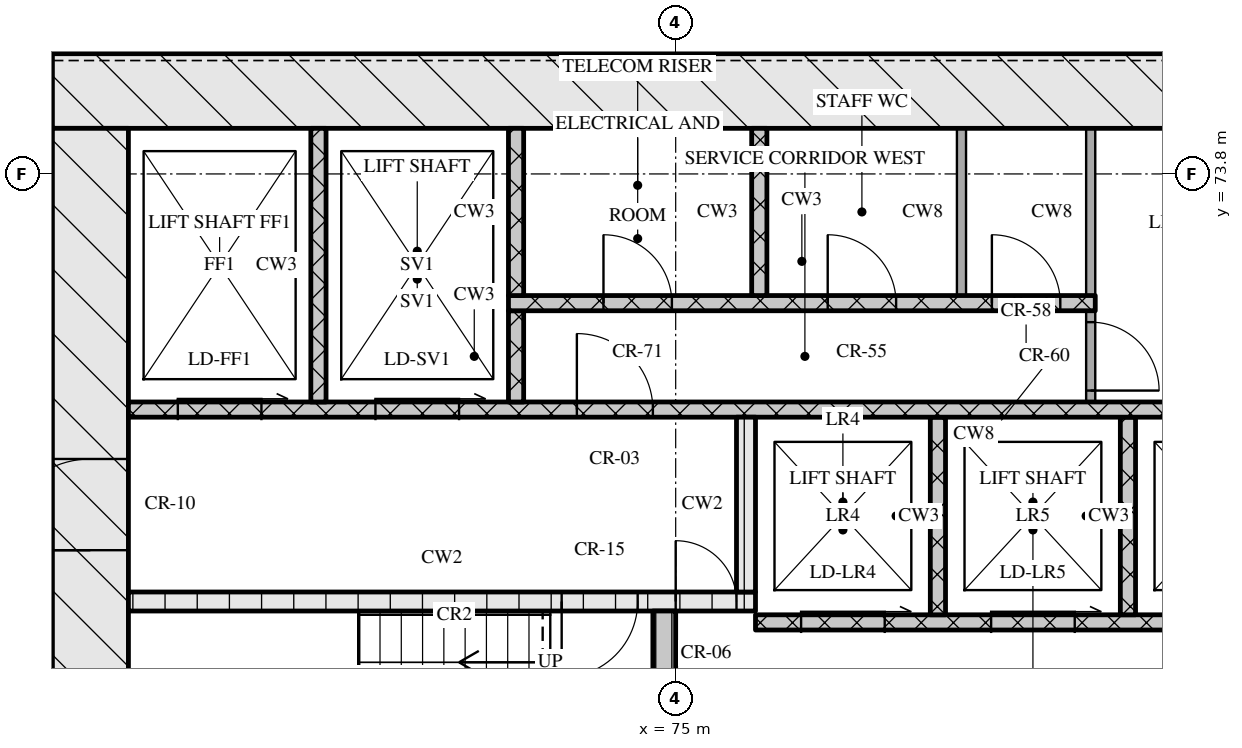
"""IFC4 building model, lengths in metres.
Left out: names, types, materials, properties, quantities, classifications, styles, units other than length and angle.
Written with IfcOpenShell. Run it as: python <this file> out.ifc"""

import sys

from ifc_helpers import new_model, si_unit, direction, frame, frame_2d, origin, place, context, subcontext, project, spatial, rectangle, extrude, element, fill, save


model = new_model("IFC4")
c1 = context("Model", 3, precision=1e-05, world=origin(), true_north=direction((0.0, 1.0)))
c2 = subcontext(c1, "Body", "Model", "MODEL_VIEW")
j1 = project(units=[si_unit("LENGTHUNIT", "METRE"), si_unit("PLANEANGLEUNIT", "RADIAN")], contexts=[c1])
p1 = place(None, origin())
s1 = spatial("IfcSite", under=j1, at=p1, CompositionType="ELEMENT")
p2 = place(p1, origin())
s2 = spatial("IfcBuilding", under=s1, at=p2, CompositionType="ELEMENT")
p3 = place(p2, frame((0.0, 0.0, 124.05)))
s3 = spatial("IfcBuildingStorey", under=s2, at=p3, CompositionType="ELEMENT", Elevation=124.05)
p4 = place(p3, frame((66.8, 74.9, 0.0), z_axis=(0.0, 0.0, 1.0), x_axis=(1.0, 0.0, 0.0)))
e1 = element("IfcWall", 1, at=p4, inside=s3, PredefinedType="SOLIDWALL", context=c2, shape_type="SweptSolid", body=[
    extrude(rectangle(XDim=41.6, YDim=1.0, at=frame_2d((20.8, 0.0))), origin(), (0.0, 0.0, 1.0), 3.32),
])
p5 = place(p3, frame((67.3, 62.4, 0.0), z_axis=(0.0, 0.0, 1.0), x_axis=(0.0, 1.0, 0.0)))
e2 = element("IfcWall", 2, at=p5, inside=s3, PredefinedType="SOLIDWALL", context=c2, shape_type="SweptSolid", body=[
    extrude(rectangle(XDim=12.0, YDim=1.0, at=frame_2d((6.0, 0.0))), origin(), (0.0, 0.0, 1.0), 3.32),
])
p6 = place(p5, frame((6.45, 0.0, 0.0)))
e3 = element("IfcOpeningElement", 3, at=p6, cuts=e2, PredefinedType="OPENING", context=c2, shape_type="SweptSolid", body=[
    extrude(rectangle(XDim=1.2, YDim=2.1, at=frame_2d((0.6, 1.05))), frame((0.0, 0.51, 0.0), z_axis=(0.0, -1.0, 0.0), x_axis=(1.0, 0.0, 0.0)), (0.0, 0.0, 1.0), 1.02),
])
p7 = place(p3, frame((74.85, 65.2, 0.0), z_axis=(0.0, 0.0, 1.0), x_axis=(0.0, 1.0, 0.0)))
e4 = element("IfcWall", 4, at=p7, inside=s3, PredefinedType="SOLIDWALL", context=c2, shape_type="SweptSolid", body=[
    extrude(rectangle(XDim=2.85, YDim=0.3, at=frame_2d((1.425, 0.0))), origin(), (0.0, 0.0, 1.0), 3.32),
])
p8 = place(p3, frame((76.05, 67.9, 0.0), z_axis=(0.0, 0.0, 1.0), x_axis=(1.0, 0.0, 0.0)))
e5 = element("IfcWall", 5, at=p8, inside=s3, PredefinedType="SOLIDWALL", context=c2, shape_type="SweptSolid", body=[
    extrude(rectangle(XDim=23.1, YDim=0.2, at=frame_2d((11.55, 0.0))), origin(), (0.0, 0.0, 1.0), 3.32),
])
p9 = place(p8, frame((0.6, 0.0, 0.0)))
e6 = element("IfcOpeningElement", 6, at=p9, cuts=e5, PredefinedType="OPENING", context=c2, shape_type="SweptSolid", body=[
    extrude(rectangle(XDim=1.1, YDim=2.1, at=frame_2d((0.55, 1.05))), frame((0.0, 0.11, 0.0), z_axis=(0.0, -1.0, 0.0), x_axis=(1.0, 0.0, 0.0)), (0.0, 0.0, 1.0), 0.22),
])
p10 = place(p8, frame((3.1, 0.0, 0.0)))
e7 = element("IfcOpeningElement", 7, at=p10, cuts=e5, PredefinedType="OPENING", context=c2, shape_type="SweptSolid", body=[
    extrude(rectangle(XDim=1.1, YDim=2.1, at=frame_2d((0.55, 1.05))), frame((0.0, 0.11, 0.0), z_axis=(0.0, -1.0, 0.0), x_axis=(1.0, 0.0, 0.0)), (0.0, 0.0, 1.0), 0.22),
])
p11 = place(p8, frame((5.6, 0.0, 0.0)))
e8 = element("IfcOpeningElement", 8, at=p11, cuts=e5, PredefinedType="OPENING", context=c2, shape_type="SweptSolid", body=[
    extrude(rectangle(XDim=1.1, YDim=2.1, at=frame_2d((0.55, 1.05))), frame((0.0, 0.11, 0.0), z_axis=(0.0, -1.0, 0.0), x_axis=(1.0, 0.0, 0.0)), (0.0, 0.0, 1.0), 0.22),
])
p12 = place(p8, frame((8.45, 0.0, 0.0)))
e9 = element("IfcOpeningElement", 9, at=p12, cuts=e5, PredefinedType="OPENING", context=c2, shape_type="SweptSolid", body=[
    extrude(rectangle(XDim=0.9, YDim=2.1, at=frame_2d((0.45, 1.05))), frame((0.0, 0.11, 0.0), z_axis=(0.0, -1.0, 0.0), x_axis=(1.0, 0.0, 0.0)), (0.0, 0.0, 1.0), 0.22),
])
p13 = place(p8, frame((10.91, 0.0, 0.0)))
e10 = element("IfcOpeningElement", 10, at=p13, cuts=e5, PredefinedType="OPENING", context=c2, shape_type="SweptSolid", body=[
    extrude(rectangle(XDim=0.9, YDim=2.1, at=frame_2d((0.45, 1.05))), frame((0.0, 0.11, 0.0), z_axis=(0.0, -1.0, 0.0), x_axis=(1.0, 0.0, 0.0)), (0.0, 0.0, 1.0), 0.22),
])
p14 = place(p8, frame((13.55, 0.0, 0.0)))
e11 = element("IfcOpeningElement", 11, at=p14, cuts=e5, PredefinedType="OPENING", context=c2, shape_type="SweptSolid", body=[
    extrude(rectangle(XDim=1.0, YDim=2.1, at=frame_2d((0.5, 1.05))), frame((0.0, 0.11, 0.0), z_axis=(0.0, -1.0, 0.0), x_axis=(1.0, 0.0, 0.0)), (0.0, 0.0, 1.0), 0.22),
])
for number, where, z_axis, x_axis in (
    (12, (78.45, 68.0, 0.0), (0.0, 0.0, 1.0), (0.0, 1.0, 0.0)),
    (13, (80.95, 68.0, 0.0), (0.0, 0.0, 1.0), (0.0, 1.0, 0.0)),
):
    element("IfcWall", number, at=place(p3, frame(where, z_axis=z_axis, x_axis=x_axis)), inside=s3, PredefinedType="SOLIDWALL", context=c2, shape_type="SweptSolid", body=[
        extrude(rectangle(XDim=2.6, YDim=0.2, at=frame_2d((1.3, 0.0))), origin(), (0.0, 0.0, 1.0), 3.32),
    ])
p15 = place(p3, frame((67.8, 68.175, 0.0), z_axis=(0.0, 0.0, 1.0), x_axis=(1.0, 0.0, 0.0)))
e14 = element("IfcWall", 14, at=p15, inside=s3, PredefinedType="SOLIDWALL", context=c2, shape_type="SweptSolid", body=[
    extrude(rectangle(XDim=8.25, YDim=0.25, at=frame_2d((4.125, 0.0))), origin(), (0.0, 0.0, 1.0), 3.32),
])
p16 = place(p15, frame((5.7, 0.0, 0.0)))
e15 = element("IfcOpeningElement", 15, at=p16, cuts=e14, PredefinedType="OPENING", context=c2, shape_type="SweptSolid", body=[
    extrude(rectangle(XDim=1.0, YDim=2.1, at=frame_2d((0.5, 1.05))), frame((0.0, 0.135, 0.0), z_axis=(0.0, -1.0, 0.0), x_axis=(1.0, 0.0, 0.0)), (0.0, 0.0, 1.0), 0.27),
])
p17 = place(p15, frame((7.2, 0.0, 0.0)))
e16 = element("IfcOpeningElement", 16, at=p17, cuts=e14, PredefinedType="OPENING", context=c2, shape_type="SweptSolid", body=[
    extrude(rectangle(XDim=0.8, YDim=2.1, at=frame_2d((0.4, 1.05))), frame((0.0, 0.135, 0.0), z_axis=(0.0, -1.0, 0.0), x_axis=(1.0, 0.0, 0.0)), (0.0, 0.0, 1.0), 0.27),
])
p18 = place(p3, frame((75.925, 68.3, 0.0), z_axis=(0.0, 0.0, 1.0), x_axis=(0.0, 1.0, 0.0)))
e17 = element("IfcWall", 17, at=p18, inside=s3, PredefinedType="SOLIDWALL", context=c2, shape_type="SweptSolid", body=[
    extrude(rectangle(XDim=2.3, YDim=0.25, at=frame_2d((1.15, 0.0))), origin(), (0.0, 0.0, 1.0), 3.32),
])
p19 = place(p3, frame((67.8, 70.7, 0.0), z_axis=(0.0, 0.0, 1.0), x_axis=(1.0, 0.0, 0.0)))
e18 = element("IfcWall", 18, at=p19, inside=s3, PredefinedType="SOLIDWALL", context=c2, shape_type="SweptSolid", body=[
    extrude(rectangle(XDim=39.6, YDim=0.2, at=frame_2d((19.8, 0.0))), origin(), (0.0, 0.0, 1.0), 3.32),
])
p20 = place(p19, frame((0.65, 0.0, 0.0)))
e19 = element("IfcOpeningElement", 19, at=p20, cuts=e18, PredefinedType="OPENING", context=c2, shape_type="SweptSolid", body=[
    extrude(rectangle(XDim=1.1, YDim=2.1, at=frame_2d((0.55, 1.05))), frame((0.0, 0.11, 0.0), z_axis=(0.0, -1.0, 0.0), x_axis=(1.0, 0.0, 0.0)), (0.0, 0.0, 1.0), 0.22),
])
p21 = place(p19, frame((3.25, 0.0, 0.0)))
e20 = element("IfcOpeningElement", 20, at=p21, cuts=e18, PredefinedType="OPENING", context=c2, shape_type="SweptSolid", body=[
    extrude(rectangle(XDim=1.1, YDim=2.1, at=frame_2d((0.55, 1.05))), frame((0.0, 0.11, 0.0), z_axis=(0.0, -1.0, 0.0), x_axis=(1.0, 0.0, 0.0)), (0.0, 0.0, 1.0), 0.22),
])
p22 = place(p19, frame((5.9, 0.0, 0.0)))
e21 = element("IfcOpeningElement", 21, at=p22, cuts=e18, PredefinedType="OPENING", context=c2, shape_type="SweptSolid", body=[
    extrude(rectangle(XDim=1.0, YDim=2.1, at=frame_2d((0.5, 1.05))), frame((0.0, 0.11, 0.0), z_axis=(0.0, -1.0, 0.0), x_axis=(1.0, 0.0, 0.0)), (0.0, 0.0, 1.0), 0.22),
])
p23 = place(p19, frame((21.7, 0.0, 0.0)))
e22 = element("IfcOpeningElement", 22, at=p23, cuts=e18, PredefinedType="OPENING", context=c2, shape_type="SweptSolid", body=[
    extrude(rectangle(XDim=1.0, YDim=2.1, at=frame_2d((0.5, 1.05))), frame((0.0, 0.11, 0.0), z_axis=(0.0, -1.0, 0.0), x_axis=(1.0, 0.0, 0.0)), (0.0, 0.0, 1.0), 0.22),
])
p24 = place(p19, frame((32.7, 0.0, 0.0)))
e23 = element("IfcOpeningElement", 23, at=p24, cuts=e18, PredefinedType="OPENING", context=c2, shape_type="SweptSolid", body=[
    extrude(rectangle(XDim=1.0, YDim=2.1, at=frame_2d((0.5, 1.05))), frame((0.0, 0.11, 0.0), z_axis=(0.0, -1.0, 0.0), x_axis=(1.0, 0.0, 0.0)), (0.0, 0.0, 1.0), 0.22),
])
p25 = place(p19, frame((35.25, 0.0, 0.0)))
e24 = element("IfcOpeningElement", 24, at=p25, cuts=e18, PredefinedType="OPENING", context=c2, shape_type="SweptSolid", body=[
    extrude(rectangle(XDim=1.1, YDim=2.1, at=frame_2d((0.55, 1.05))), frame((0.0, 0.11, 0.0), z_axis=(0.0, -1.0, 0.0), x_axis=(1.0, 0.0, 0.0)), (0.0, 0.0, 1.0), 0.22),
])
p26 = place(p19, frame((37.85, 0.0, 0.0)))
e25 = element("IfcOpeningElement", 25, at=p26, cuts=e18, PredefinedType="OPENING", context=c2, shape_type="SweptSolid", body=[
    extrude(rectangle(XDim=1.1, YDim=2.1, at=frame_2d((0.55, 1.05))), frame((0.0, 0.11, 0.0), z_axis=(0.0, -1.0, 0.0), x_axis=(1.0, 0.0, 0.0)), (0.0, 0.0, 1.0), 0.22),
])
p27 = place(p3, frame((70.3, 70.8, 0.0), z_axis=(0.0, 0.0, 1.0), x_axis=(0.0, 1.0, 0.0)))
e26 = element("IfcWall", 26, at=p27, inside=s3, PredefinedType="SOLIDWALL", context=c2, shape_type="SweptSolid", body=[
    extrude(rectangle(XDim=3.6, YDim=0.2, at=frame_2d((1.8, 0.0))), origin(), (0.0, 0.0, 1.0), 3.32),
])
p28 = place(p3, frame((72.9, 70.8, 0.0), z_axis=(0.0, 0.0, 1.0), x_axis=(0.0, 1.0, 0.0)))
e27 = element("IfcWall", 27, at=p28, inside=s3, PredefinedType="SOLIDWALL", context=c2, shape_type="SweptSolid", body=[
    extrude(rectangle(XDim=1.2, YDim=0.2, at=frame_2d((0.6, 0.0))), origin(), (0.0, 0.0, 1.0), 3.32),
])
p29 = place(p3, frame((80.46, 70.8, 0.0), z_axis=(0.0, 0.0, 1.0), x_axis=(0.0, 1.0, 0.0)))
e28 = element("IfcWall", 28, at=p29, inside=s3, PredefinedType="PARTITIONING", context=c2, shape_type="SweptSolid", body=[
    extrude(rectangle(XDim=1.2, YDim=0.12, at=frame_2d((0.6, 0.0))), origin(), (0.0, 0.0, 1.0), 3.32),
])
p30 = place(p29, frame((0.15, 0.0, 0.0)))
e29 = element("IfcOpeningElement", 29, at=p30, cuts=e28, PredefinedType="OPENING", context=c2, shape_type="SweptSolid", body=[
    extrude(rectangle(XDim=0.9, YDim=2.1, at=frame_2d((0.45, 1.05))), frame((0.0, 0.07, 0.0), z_axis=(0.0, -1.0, 0.0), x_axis=(1.0, 0.0, 0.0)), (0.0, 0.0, 1.0), 0.14),
])
p31 = place(p3, frame((72.8, 72.1, 0.0), z_axis=(0.0, 0.0, 1.0), x_axis=(1.0, 0.0, 0.0)))
e30 = element("IfcWall", 30, at=p31, inside=s3, PredefinedType="SOLIDWALL", context=c2, shape_type="SweptSolid", body=[
    extrude(rectangle(XDim=7.72, YDim=0.2, at=frame_2d((3.86, 0.0))), origin(), (0.0, 0.0, 1.0), 3.32),
])
p32 = place(p31, frame((1.25, 0.0, 0.0)))
e31 = element("IfcOpeningElement", 31, at=p32, cuts=e30, PredefinedType="OPENING", context=c2, shape_type="SweptSolid", body=[
    extrude(rectangle(XDim=0.9, YDim=2.1, at=frame_2d((0.45, 1.05))), frame((0.0, 0.11, 0.0), z_axis=(0.0, -1.0, 0.0), x_axis=(1.0, 0.0, 0.0)), (0.0, 0.0, 1.0), 0.22),
])
p33 = place(p31, frame((4.2, 0.0, 0.0)))
e32 = element("IfcOpeningElement", 32, at=p33, cuts=e30, PredefinedType="OPENING", context=c2, shape_type="SweptSolid", body=[
    extrude(rectangle(XDim=0.9, YDim=2.1, at=frame_2d((0.45, 1.05))), frame((0.0, 0.11, 0.0), z_axis=(0.0, -1.0, 0.0), x_axis=(1.0, 0.0, 0.0)), (0.0, 0.0, 1.0), 0.22),
])
p34 = place(p31, frame((6.36, 0.0, 0.0)))
e33 = element("IfcOpeningElement", 33, at=p34, cuts=e30, PredefinedType="OPENING", context=c2, shape_type="SweptSolid", body=[
    extrude(rectangle(XDim=0.9, YDim=2.1, at=frame_2d((0.45, 1.05))), frame((0.0, 0.11, 0.0), z_axis=(0.0, -1.0, 0.0), x_axis=(1.0, 0.0, 0.0)), (0.0, 0.0, 1.0), 0.22),
])
for number, where, z_axis, x_axis in (
    (34, (72.9, 72.2, 0.0), (0.0, 0.0, 1.0), (0.0, 1.0, 0.0)),
    (35, (76.1, 72.2, 0.0), (0.0, 0.0, 1.0), (0.0, 1.0, 0.0)),
):
    element("IfcWall", number, at=place(p3, frame(where, z_axis=z_axis, x_axis=x_axis)), inside=s3, PredefinedType="SOLIDWALL", context=c2, shape_type="SweptSolid", body=[
        extrude(rectangle(XDim=2.2, YDim=0.2, at=frame_2d((1.1, 0.0))), origin(), (0.0, 0.0, 1.0), 3.32),
    ])
for number, where, z_axis, x_axis in (
    (36, (78.76, 72.2, 0.0), (0.0, 0.0, 1.0), (0.0, 1.0, 0.0)),
    (37, (80.46, 72.2, 0.0), (0.0, 0.0, 1.0), (0.0, 1.0, 0.0)),
):
    element("IfcWall", number, at=place(p3, frame(where, z_axis=z_axis, x_axis=x_axis)), inside=s3, PredefinedType="PARTITIONING", context=c2, shape_type="SweptSolid", body=[
        extrude(rectangle(XDim=2.2, YDim=0.12, at=frame_2d((1.1, 0.0))), origin(), (0.0, 0.0, 1.0), 3.32),
    ])
p35 = place(p9, origin())
e38 = element("IfcDoor", 38, at=p35, inside=s3, OperationType="SLIDING_TO_RIGHT", PredefinedType="DOOR", context=c2, shape_type="SweptSolid", body=[
    extrude(rectangle(XDim=1.1, YDim=2.1, at=frame_2d((0.55, 1.05))), frame((0.0, 0.025, 0.0), z_axis=(0.0, -1.0, 0.0), x_axis=(1.0, 0.0, 0.0)), (0.0, 0.0, 1.0), 0.05),
])
fill(e6, e38)
p36 = place(p10, origin())
e39 = element("IfcDoor", 39, at=p36, inside=s3, OperationType="SLIDING_TO_RIGHT", PredefinedType="DOOR", context=c2, shape_type="SweptSolid", body=[
    extrude(rectangle(XDim=1.1, YDim=2.1, at=frame_2d((0.55, 1.05))), frame((0.0, 0.025, 0.0), z_axis=(0.0, -1.0, 0.0), x_axis=(1.0, 0.0, 0.0)), (0.0, 0.0, 1.0), 0.05),
])
fill(e7, e39)
p37 = place(p16, origin())
e40 = element("IfcDoor", 40, at=p37, inside=s3, OperationType="SINGLE_SWING_RIGHT", PredefinedType="DOOR", context=c2, shape_type="SweptSolid", body=[
    extrude(rectangle(XDim=1.0, YDim=2.1, at=frame_2d((0.5, 1.05))), frame((0.0, 0.025, 0.0), z_axis=(0.0, -1.0, 0.0), x_axis=(1.0, 0.0, 0.0)), (0.0, 0.0, 1.0), 0.05),
])
fill(e15, e40)
p38 = place(p17, origin())
e41 = element("IfcDoor", 41, at=p38, inside=s3, OperationType="SINGLE_SWING_LEFT", PredefinedType="DOOR", context=c2, shape_type="SweptSolid", body=[
    extrude(rectangle(XDim=0.8, YDim=2.1, at=frame_2d((0.4, 1.05))), frame((0.0, 0.025, 0.0), z_axis=(0.0, -1.0, 0.0), x_axis=(1.0, 0.0, 0.0)), (0.0, 0.0, 1.0), 0.05),
])
fill(e16, e41)
p39 = place(p6, origin())
e42 = element("IfcDoor", 42, at=p39, inside=s3, OperationType="SINGLE_SWING_LEFT", PredefinedType="DOOR", context=c2, shape_type="SweptSolid", body=[
    extrude(rectangle(XDim=1.2, YDim=2.1, at=frame_2d((0.6, 1.05))), frame((0.0, 0.025, 0.0), z_axis=(0.0, -1.0, 0.0), x_axis=(1.0, 0.0, 0.0)), (0.0, 0.0, 1.0), 0.05),
])
fill(e3, e42)
p40 = place(p20, origin())
e43 = element("IfcDoor", 43, at=p40, inside=s3, OperationType="SLIDING_TO_RIGHT", PredefinedType="DOOR", context=c2, shape_type="SweptSolid", body=[
    extrude(rectangle(XDim=1.1, YDim=2.1, at=frame_2d((0.55, 1.05))), frame((0.0, 0.025, 0.0), z_axis=(0.0, -1.0, 0.0), x_axis=(1.0, 0.0, 0.0)), (0.0, 0.0, 1.0), 0.05),
])
fill(e19, e43)
p41 = place(p21, origin())
e44 = element("IfcDoor", 44, at=p41, inside=s3, OperationType="SLIDING_TO_RIGHT", PredefinedType="DOOR", context=c2, shape_type="SweptSolid", body=[
    extrude(rectangle(XDim=1.1, YDim=2.1, at=frame_2d((0.55, 1.05))), frame((0.0, 0.025, 0.0), z_axis=(0.0, -1.0, 0.0), x_axis=(1.0, 0.0, 0.0)), (0.0, 0.0, 1.0), 0.05),
])
fill(e20, e44)
p42 = place(p22, origin())
e45 = element("IfcDoor", 45, at=p42, inside=s3, OperationType="SINGLE_SWING_LEFT", PredefinedType="DOOR", context=c2, shape_type="SweptSolid", body=[
    extrude(rectangle(XDim=1.0, YDim=2.1, at=frame_2d((0.5, 1.05))), frame((0.0, 0.025, 0.0), z_axis=(0.0, -1.0, 0.0), x_axis=(1.0, 0.0, 0.0)), (0.0, 0.0, 1.0), 0.05),
])
fill(e21, e45)
p43 = place(p30, origin())
e46 = element("IfcDoor", 46, at=p43, inside=s3, OperationType="SINGLE_SWING_RIGHT", PredefinedType="DOOR", context=c2, shape_type="SweptSolid", body=[
    extrude(rectangle(XDim=0.9, YDim=2.1, at=frame_2d((0.45, 1.05))), frame((0.0, 0.025, 0.0), z_axis=(0.0, -1.0, 0.0), x_axis=(1.0, 0.0, 0.0)), (0.0, 0.0, 1.0), 0.05),
])
fill(e29, e46)
p44 = place(p32, origin())
e47 = element("IfcDoor", 47, at=p44, inside=s3, OperationType="SINGLE_SWING_LEFT", PredefinedType="DOOR", context=c2, shape_type="SweptSolid", body=[
    extrude(rectangle(XDim=0.9, YDim=2.1, at=frame_2d((0.45, 1.05))), frame((0.0, 0.025, 0.0), z_axis=(0.0, -1.0, 0.0), x_axis=(1.0, 0.0, 0.0)), (0.0, 0.0, 1.0), 0.05),
])
fill(e31, e47)
p45 = place(p33, origin())
e48 = element("IfcDoor", 48, at=p45, inside=s3, OperationType="SINGLE_SWING_LEFT", PredefinedType="DOOR", context=c2, shape_type="SweptSolid", body=[
    extrude(rectangle(XDim=0.9, YDim=2.1, at=frame_2d((0.45, 1.05))), frame((0.0, 0.025, 0.0), z_axis=(0.0, -1.0, 0.0), x_axis=(1.0, 0.0, 0.0)), (0.0, 0.0, 1.0), 0.05),
])
fill(e32, e48)
p46 = place(p34, origin())
e49 = element("IfcDoor", 49, at=p46, inside=s3, OperationType="SINGLE_SWING_LEFT", PredefinedType="DOOR", context=c2, shape_type="SweptSolid", body=[
    extrude(rectangle(XDim=0.9, YDim=2.1, at=frame_2d((0.45, 1.05))), frame((0.0, 0.025, 0.0), z_axis=(0.0, -1.0, 0.0), x_axis=(1.0, 0.0, 0.0)), (0.0, 0.0, 1.0), 0.05),
])
fill(e33, e49)
save(model, sys.argv[1])
